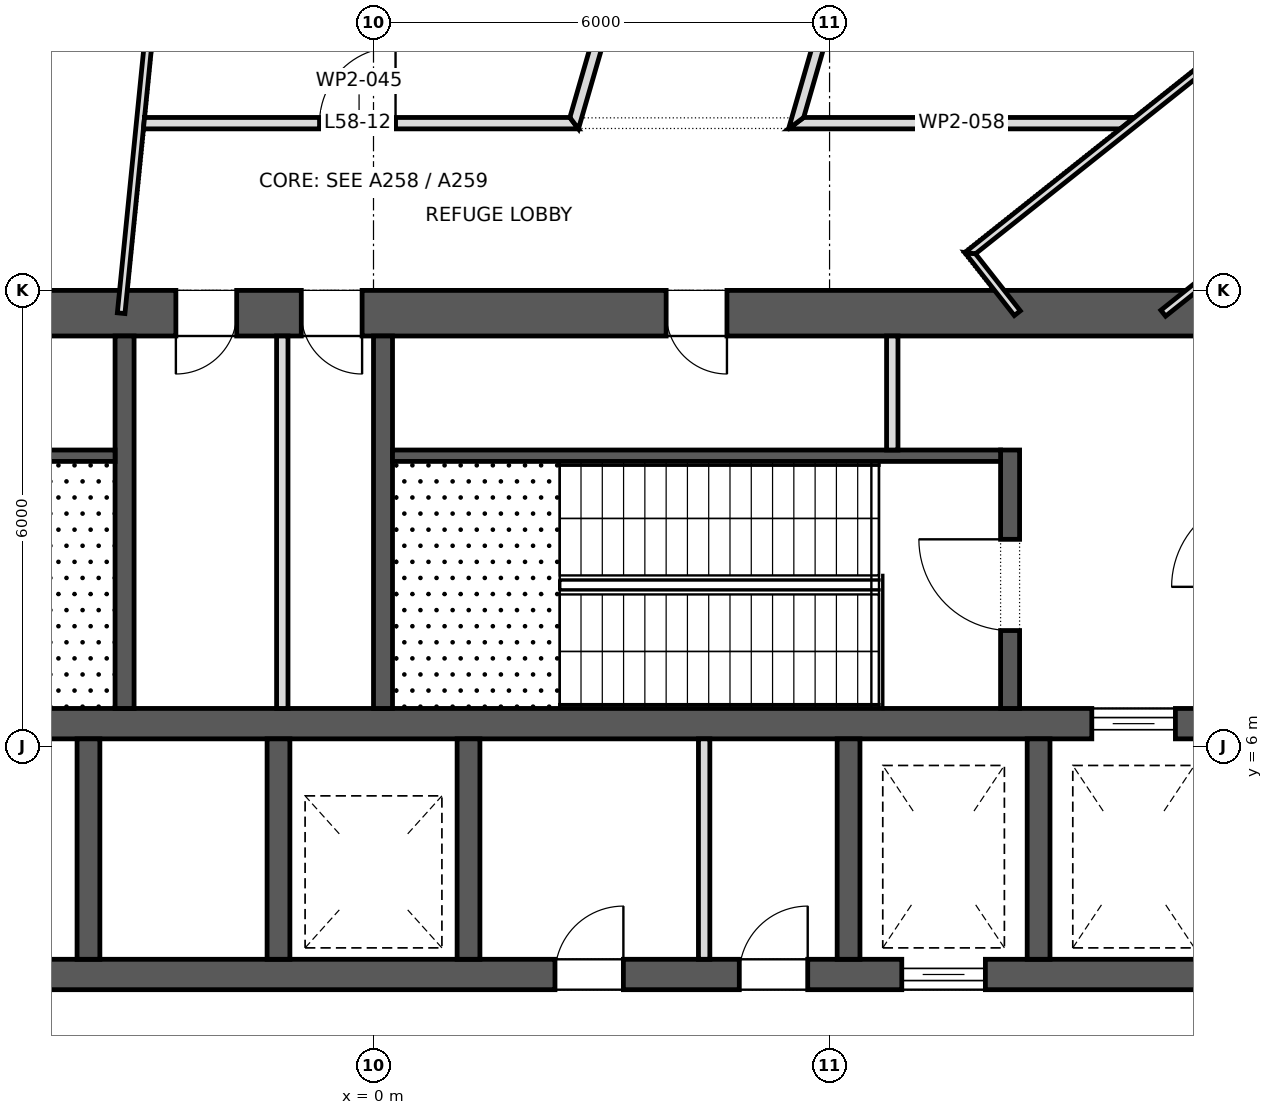
"""IFC4 building model, lengths in metres.
Left out: names, types, materials, properties, quantities, classifications, styles, units other than length and angle.
Written with IfcOpenShell. Run it as: python <this file> out.ifc"""

import sys

from ifc_helpers import new_model, si_unit, direction, frame, frame_2d, origin, place, context, subcontext, project, spatial, polyline, rectangle, outline, extrude, element, fill, save


model = new_model("IFC4")
c1 = context("Model", 3, precision=1e-05, world=origin(), true_north=direction((0.0, 1.0)))
c2 = subcontext(c1, "Body", "Model", "MODEL_VIEW")
j1 = project(units=[si_unit("LENGTHUNIT", "METRE"), si_unit("PLANEANGLEUNIT", "RADIAN")], contexts=[c1])
p1 = place(None, origin())
s1 = spatial("IfcSite", under=j1, at=p1, CompositionType="ELEMENT")
p2 = place(p1, origin())
s2 = spatial("IfcBuilding", under=s1, at=p2, CompositionType="ELEMENT")
p3 = place(p2, frame((0.0, 0.0, 250.9)))
s3 = spatial("IfcBuildingStorey", under=s2, at=p3, CompositionType="ELEMENT", Elevation=250.9)
p4 = place(p3, frame((-12.0, 11.7, 0.0), z_axis=(0.0, 0.0, 1.0), x_axis=(1.0, 0.0, 0.0)))
e1 = element("IfcWall", 1, at=p4, inside=s3, PredefinedType="SHEAR", context=c2, shape_type="SweptSolid", body=[
    extrude(rectangle(XDim=24.0, YDim=0.6, at=frame_2d((12.0, 0.0))), origin(), (0.0, 0.0, 1.0), 5.4),
])
p5 = place(p4, frame((9.4, 0.0, 0.0)))
e2 = element("IfcOpeningElement", 2, at=p5, cuts=e1, PredefinedType="OPENING", context=c2, shape_type="SweptSolid", body=[
    extrude(rectangle(XDim=0.8, YDim=2.1, at=frame_2d((0.4, 1.05))), frame((0.0, 0.312, 0.0), z_axis=(0.0, -1.0, 0.0), x_axis=(1.0, 0.0, 0.0)), (0.0, 0.0, 1.0), 0.624),
])
p6 = place(p4, frame((11.05, 0.0, 0.0)))
e3 = element("IfcOpeningElement", 3, at=p6, cuts=e1, PredefinedType="OPENING", context=c2, shape_type="SweptSolid", body=[
    extrude(rectangle(XDim=0.8, YDim=2.1, at=frame_2d((0.4, 1.05))), frame((0.0, 0.312, 0.0), z_axis=(0.0, -1.0, 0.0), x_axis=(1.0, 0.0, 0.0)), (0.0, 0.0, 1.0), 0.624),
])
p7 = place(p4, frame((4.2, 0.0, 0.0)))
e4 = element("IfcOpeningElement", 4, at=p7, cuts=e1, PredefinedType="OPENING", context=c2, shape_type="SweptSolid", body=[
    extrude(rectangle(XDim=0.8, YDim=2.1, at=frame_2d((0.4, 1.05))), frame((0.0, 0.312, 0.0), z_axis=(0.0, -1.0, 0.0), x_axis=(1.0, 0.0, 0.0)), (0.0, 0.0, 1.0), 0.624),
])
p8 = place(p4, frame((15.85, 0.0, 0.0)))
e5 = element("IfcOpeningElement", 5, at=p8, cuts=e1, PredefinedType="OPENING", context=c2, shape_type="SweptSolid", body=[
    extrude(rectangle(XDim=0.8, YDim=2.1, at=frame_2d((0.4, 1.05))), frame((0.0, 0.312, 0.0), z_axis=(0.0, -1.0, 0.0), x_axis=(1.0, 0.0, 0.0)), (0.0, 0.0, 1.0), 0.624),
])
p9 = place(p3, frame((-11.4, 3.0, 0.0), z_axis=(0.0, 0.0, 1.0), x_axis=(1.0, 0.0, 0.0)))
e6 = element("IfcWall", 6, at=p9, inside=s3, PredefinedType="SHEAR", context=c2, shape_type="SweptSolid", body=[
    extrude(rectangle(XDim=22.8, YDim=0.4, at=frame_2d((11.4, 0.0))), origin(), (0.0, 0.0, 1.0), 5.4),
])
p10 = place(p9, frame((18.35, 0.0, 0.0)))
e7 = element("IfcOpeningElement", 7, at=p10, cuts=e6, PredefinedType="OPENING", context=c2, shape_type="SweptSolid", body=[
    extrude(rectangle(XDim=1.1, YDim=2.1, at=frame_2d((0.55, 1.05))), frame((0.0, 0.212, 0.0), z_axis=(0.0, -1.0, 0.0), x_axis=(1.0, 0.0, 0.0)), (0.0, 0.0, 1.0), 0.424),
])
p11 = place(p9, frame((13.788, 0.0, 0.0)))
e8 = element("IfcOpeningElement", 8, at=p11, cuts=e6, PredefinedType="OPENING", context=c2, shape_type="SweptSolid", body=[
    extrude(rectangle(XDim=0.9, YDim=2.1, at=frame_2d((0.45, 1.05))), frame((0.0, 0.212, 0.0), z_axis=(0.0, -1.0, 0.0), x_axis=(1.0, 0.0, 0.0)), (0.0, 0.0, 1.0), 0.424),
])
p12 = place(p9, frame((16.212, 0.0, 0.0)))
e9 = element("IfcOpeningElement", 9, at=p12, cuts=e6, PredefinedType="OPENING", context=c2, shape_type="SweptSolid", body=[
    extrude(rectangle(XDim=0.9, YDim=2.1, at=frame_2d((0.45, 1.05))), frame((0.0, 0.212, 0.0), z_axis=(0.0, -1.0, 0.0), x_axis=(1.0, 0.0, 0.0)), (0.0, 0.0, 1.0), 0.424),
])
p13 = place(p3, frame((-11.4, 6.3, 0.0), z_axis=(0.0, 0.0, 1.0), x_axis=(1.0, 0.0, 0.0)))
e10 = element("IfcWall", 10, at=p13, inside=s3, PredefinedType="SHEAR", context=c2, shape_type="SweptSolid", body=[
    extrude(rectangle(XDim=22.8, YDim=0.4, at=frame_2d((11.4, 0.0))), origin(), (0.0, 0.0, 1.0), 5.4),
])
p14 = place(p13, frame((20.85, 0.0, 0.0)))
e11 = element("IfcOpeningElement", 11, at=p14, cuts=e10, PredefinedType="OPENING", context=c2, shape_type="SweptSolid", body=[
    extrude(rectangle(XDim=1.1, YDim=2.1, at=frame_2d((0.55, 1.05))), frame((0.0, 0.212, 0.0), z_axis=(0.0, -1.0, 0.0), x_axis=(1.0, 0.0, 0.0)), (0.0, 0.0, 1.0), 0.424),
])
for number, where, z_axis, x_axis in (
    (12, (-3.75, 3.2, 0.0), (0.0, 0.0, 1.0), (0.0, 1.0, 0.0)),
    (13, (-1.25, 3.2, 0.0), (0.0, 0.0, 1.0), (0.0, 1.0, 0.0)),
    (14, (1.25, 3.2, 0.0), (0.0, 0.0, 1.0), (0.0, 1.0, 0.0)),
    (15, (6.25, 3.2, 0.0), (0.0, 0.0, 1.0), (0.0, 1.0, 0.0)),
    (16, (8.75, 3.2, 0.0), (0.0, 0.0, 1.0), (0.0, 1.0, 0.0)),
):
    element("IfcWall", number, at=place(p3, frame(where, z_axis=z_axis, x_axis=x_axis)), inside=s3, PredefinedType="SHEAR", context=c2, shape_type="SweptSolid", body=[
        extrude(rectangle(XDim=2.9, YDim=0.3, at=frame_2d((1.45, 0.0))), origin(), (0.0, 0.0, 1.0), 5.4),
    ])
for number, where, z_axis, x_axis in (
    (17, (-3.275, 6.5, 0.0), (0.0, 0.0, 1.0), (0.0, 1.0, 0.0)),
    (18, (0.125, 6.5, 0.0), (0.0, 0.0, 1.0), (0.0, 1.0, 0.0)),
):
    element("IfcWall", number, at=place(p3, frame(where, z_axis=z_axis, x_axis=x_axis)), inside=s3, PredefinedType="SHEAR", context=c2, shape_type="SweptSolid", body=[
        extrude(rectangle(XDim=4.9, YDim=0.25, at=frame_2d((2.45, 0.0))), origin(), (0.0, 0.0, 1.0), 5.1),
    ])
p15 = place(p3, frame((8.375, 6.5, 0.0), z_axis=(0.0, 0.0, 1.0), x_axis=(0.0, 1.0, 0.0)))
e19 = element("IfcWall", 19, at=p15, inside=s3, PredefinedType="SHEAR", context=c2, shape_type="SweptSolid", body=[
    extrude(rectangle(XDim=3.4, YDim=0.25, at=frame_2d((1.7, 0.0))), origin(), (0.0, 0.0, 1.0), 5.1),
])
p16 = place(p15, frame((1.025, 0.0, 0.0)))
e20 = element("IfcOpeningElement", 20, at=p16, cuts=e19, PredefinedType="OPENING", context=c2, shape_type="SweptSolid", body=[
    extrude(rectangle(XDim=1.2, YDim=2.1, at=frame_2d((0.6, 1.05))), frame((0.0, 0.137, 0.0), z_axis=(0.0, -1.0, 0.0), x_axis=(1.0, 0.0, 0.0)), (0.0, 0.0, 1.0), 0.274),
])
for number, where, z_axis, x_axis in (
    (21, (-11.4, 9.825, 0.0), (0.0, 0.0, 1.0), (1.0, 0.0, 0.0)),
    (22, (0.25, 9.825, 0.0), (0.0, 0.0, 1.0), (1.0, 0.0, 0.0)),
):
    element("IfcWall", number, at=place(p3, frame(where, z_axis=z_axis, x_axis=x_axis)), inside=s3, PredefinedType="SHEAR", context=c2, shape_type="SweptSolid", body=[
        extrude(rectangle(XDim=8.0, YDim=0.15, at=frame_2d((4.0, 0.0))), origin(), (0.0, 0.0, 1.0), 5.1),
    ])
p17 = place(p3, frame((-1.2, 6.5, 0.0), z_axis=(0.0, 0.0, 1.0), x_axis=(0.0, 1.0, 0.0)))
e23 = element("IfcWall", 23, at=p17, inside=s3, PredefinedType="PARTITIONING", context=c2, shape_type="SweptSolid", body=[
    extrude(rectangle(XDim=4.9, YDim=0.15, at=frame_2d((2.45, 0.0))), origin(), (0.0, 0.0, 1.0), 5.1),
])
p18 = place(p3, frame((6.825, 9.9, 0.0), z_axis=(0.0, 0.0, 1.0), x_axis=(0.0, 1.0, 0.0)))
e24 = element("IfcWall", 24, at=p18, inside=s3, PredefinedType="PARTITIONING", context=c2, shape_type="SweptSolid", body=[
    extrude(rectangle(XDim=1.5, YDim=0.15, at=frame_2d((0.75, 0.0))), origin(), (0.0, 0.0, 1.0), 5.1),
])
p19 = place(p3, frame((4.35, 3.2, 0.0), z_axis=(0.0, 0.0, 1.0), x_axis=(0.0, 1.0, 0.0)))
e25 = element("IfcWall", 25, at=p19, inside=s3, PredefinedType="PARTITIONING", context=c2, shape_type="SweptSolid", body=[
    extrude(rectangle(XDim=2.9, YDim=0.15, at=frame_2d((1.45, 0.0))), origin(), (0.0, 0.0, 1.0), 5.1),
])
p20 = place(p3, frame((-3.32, 11.7, 0.0), z_axis=(0.0, 0.0, 1.0), x_axis=(0.0995179867, 0.995035763339, 0.0)))
e26 = element("IfcWall", 26, at=p20, inside=s3, PredefinedType="PARTITIONING", context=c2, shape_type="SweptSolid", body=[
    extrude(outline(polyline([(0.0, -0.05), (1.295, -0.05), (2.59, -0.05), (2.593, -0.05), (2.593, -0.05), (4.552, -0.05), (6.512, -0.05), (8.471, -0.05), (8.471, 0.05), (6.777, 0.05), (5.083, 0.05), (3.388, 0.05), (1.694, 0.05), (0.0, 0.05), (0.0, -0.05)])), origin(), (0.0, 0.0, 1.0), 5.1),
])
p21 = place(p3, frame((-3.027, 14.2, 0.0), z_axis=(0.0, 0.0, 1.0), x_axis=(1.0, 0.0, 0.0)))
e27 = element("IfcWall", 27, at=p21, inside=s3, PredefinedType="PARTITIONING", context=c2, shape_type="SweptSolid", body=[
    extrude(outline(polyline([(5.723, -0.075), (5.723, -0.075), (5.667, 0.0), (5.611, 0.075), (3.745, 0.075), (1.88, 0.075), (0.015, 0.075), (0.0, -0.073), (0.0, -0.075), (1.908, -0.075), (3.816, -0.075), (5.723, -0.075)])), origin(), (0.0, 0.0, 1.0), 5.1),
])
p22 = place(p21, frame((2.317, 0.0, 0.0)))
e28 = element("IfcOpeningElement", 28, at=p22, cuts=e27, PredefinedType="OPENING", context=c2, shape_type="SweptSolid", body=[
    extrude(rectangle(XDim=1.0, YDim=2.1, at=frame_2d((0.5, 1.05))), frame((0.0, 0.087, 0.0), z_axis=(0.0, -1.0, 0.0), x_axis=(1.0, 0.0, 0.0)), (0.0, 0.0, 1.0), 0.174),
])
p23 = place(p3, frame((2.624, 14.146, 0.0), z_axis=(0.0, 0.0, 1.0), x_axis=(0.277874591474, 0.960617359521, 0.0)))
e29 = element("IfcWall", 29, at=p23, inside=s3, PredefinedType="PARTITIONING", context=c2, shape_type="SweptSolid", body=[
    extrude(outline(polyline([(9.822, -0.075), (9.822, -0.075), (9.654, 0.075), (7.746, 0.075), (5.837, 0.075), (3.929, 0.075), (2.021, 0.075), (0.113, 0.075), (0.0, -0.075), (1.965, -0.075), (3.929, -0.075), (5.893, -0.075), (7.857, -0.075), (9.822, -0.075)])), origin(), (0.0, 0.0, 1.0), 5.1),
])
p24 = place(p3, frame((5.46, 14.2, 0.0), z_axis=(0.0, 0.0, 1.0), x_axis=(1.0, 0.0, 0.0)))
e30 = element("IfcWall", 30, at=p24, inside=s3, PredefinedType="PARTITIONING", context=c2, shape_type="SweptSolid", body=[
    extrude(outline(polyline([(0.0, -0.075), (1.455, -0.075), (2.91, -0.075), (4.365, -0.075), (4.553, 0.075), (3.102, 0.075), (1.651, 0.075), (0.199, 0.075), (0.1, 0.0), (0.0, -0.075)])), origin(), (0.0, 0.0, 1.0), 5.1),
])
p25 = place(p3, frame((7.819, 12.529, 0.0), z_axis=(0.0, 0.0, 1.0), x_axis=(0.617350830979, -0.786687963229, 0.0)))
e31 = element("IfcWall", 31, at=p25, inside=s3, PredefinedType="PARTITIONING", context=c2, shape_type="SweptSolid", body=[
    extrude(outline(polyline([(1.054, 0.05), (0.099, 0.05), (0.0, -0.05), (0.0, -0.05), (1.054, -0.05), (1.054, 0.05)])), origin(), (0.0, 0.0, 1.0), 5.1),
])
p26 = place(p3, frame((7.811, 12.459, 0.0), z_axis=(0.0, 0.0, 1.0), x_axis=(0.782532006264, 0.622610359031, 0.0)))
e32 = element("IfcWall", 32, at=p26, inside=s3, PredefinedType="PARTITIONING", context=c2, shape_type="SweptSolid", body=[
    extrude(outline(polyline([(11.08, 0.05), (9.234, 0.05), (7.387, 0.05), (5.54, 0.05), (3.694, 0.05), (1.847, 0.05), (0.0, 0.05), (0.1, -0.05), (1.93, -0.05), (3.76, -0.05), (5.59, -0.05), (7.42, -0.05), (9.25, -0.05), (11.08, -0.05), (11.08, 0.05)])), origin(), (0.0, 0.0, 1.0), 5.1),
])
p27 = place(p3, frame((10.39, 11.7, 0.0), z_axis=(0.0, 0.0, 1.0), x_axis=(0.782322562036, 0.622873509574, 0.0)))
e33 = element("IfcWall", 33, at=p27, inside=s3, PredefinedType="PARTITIONING", context=c2, shape_type="SweptSolid", body=[
    extrude(outline(polyline([(0.0, 0.05), (0.0, -0.05), (1.636, -0.05), (3.272, -0.05), (3.272, 0.05), (1.636, 0.05), (0.0, 0.05)])), origin(), (0.0, 0.0, 1.0), 5.1),
])
p28 = place(p3, frame((7.079, 19.461, 0.0), z_axis=(0.0, 0.0, 1.0), x_axis=(-0.277490255222, -0.960728451883, 0.0)))
e34 = element("IfcWall", 34, at=p28, inside=s3, PredefinedType="PARTITIONING", context=c2, shape_type="SweptSolid", body=[
    extrude(outline(polyline([(5.575, -0.075), (5.575, -0.075), (5.376, 0.075), (3.584, 0.075), (1.792, 0.075), (0.0, 0.075), (0.0, -0.075), (1.858, -0.075), (3.717, -0.075), (5.575, -0.075)])), origin(), (0.0, 0.0, 1.0), 5.1),
])
p29 = place(p28, frame((0.38, 0.0, 0.0)))
e35 = element("IfcOpeningElement", 35, at=p29, cuts=e34, PredefinedType="OPENING", context=c2, shape_type="SweptSolid", body=[
    extrude(rectangle(XDim=1.0, YDim=2.1, at=frame_2d((0.5, 1.05))), frame((0.0, 0.087, 0.0), z_axis=(0.0, -1.0, 0.0), x_axis=(1.0, 0.0, 0.0)), (0.0, 0.0, 1.0), 0.174),
])
p30 = place(p14, origin())
e36 = element("IfcDoor", 36, at=p30, inside=s3, OperationType="SLIDING_TO_LEFT", PredefinedType="DOOR", context=c2, shape_type="SweptSolid", body=[
    extrude(rectangle(XDim=1.1, YDim=2.1, at=frame_2d((0.55, 1.05))), frame((0.0, 0.025, 0.0), z_axis=(0.0, -1.0, 0.0), x_axis=(1.0, 0.0, 0.0)), (0.0, 0.0, 1.0), 0.05),
])
fill(e11, e36)
p31 = place(p10, origin())
e37 = element("IfcDoor", 37, at=p31, inside=s3, OperationType="SLIDING_TO_LEFT", PredefinedType="DOOR", context=c2, shape_type="SweptSolid", body=[
    extrude(rectangle(XDim=1.1, YDim=2.1, at=frame_2d((0.55, 1.05))), frame((0.0, 0.025, 0.0), z_axis=(0.0, -1.0, 0.0), x_axis=(1.0, 0.0, 0.0)), (0.0, 0.0, 1.0), 0.05),
])
fill(e7, e37)
p32 = place(p16, origin())
e38 = element("IfcDoor", 38, at=p32, inside=s3, OperationType="SINGLE_SWING_LEFT", PredefinedType="DOOR", context=c2, shape_type="SweptSolid", body=[
    extrude(rectangle(XDim=1.2, YDim=2.1, at=frame_2d((0.6, 1.05))), frame((0.0, 0.025, 0.0), z_axis=(0.0, -1.0, 0.0), x_axis=(1.0, 0.0, 0.0)), (0.0, 0.0, 1.0), 0.05),
])
fill(e20, e38)
p33 = place(p5, frame((0.8, 0.0, 0.0), z_axis=(0.0, 0.0, 1.0), x_axis=(-1.0, 0.0, 0.0)))
e39 = element("IfcDoor", 39, at=p33, inside=s3, OperationType="SINGLE_SWING_LEFT", PredefinedType="DOOR", context=c2, shape_type="SweptSolid", body=[
    extrude(rectangle(XDim=0.8, YDim=2.1, at=frame_2d((0.4, 1.05))), frame((0.0, 0.025, 0.0), z_axis=(0.0, -1.0, 0.0), x_axis=(1.0, 0.0, 0.0)), (0.0, 0.0, 1.0), 0.05),
])
fill(e2, e39)
p34 = place(p6, frame((0.8, 0.0, 0.0), z_axis=(0.0, 0.0, 1.0), x_axis=(-1.0, 0.0, 0.0)))
e40 = element("IfcDoor", 40, at=p34, inside=s3, OperationType="SINGLE_SWING_RIGHT", PredefinedType="DOOR", context=c2, shape_type="SweptSolid", body=[
    extrude(rectangle(XDim=0.8, YDim=2.1, at=frame_2d((0.4, 1.05))), frame((0.0, 0.025, 0.0), z_axis=(0.0, -1.0, 0.0), x_axis=(1.0, 0.0, 0.0)), (0.0, 0.0, 1.0), 0.05),
])
fill(e3, e40)
p35 = place(p8, frame((0.8, 0.0, 0.0), z_axis=(0.0, 0.0, 1.0), x_axis=(-1.0, 0.0, 0.0)))
e41 = element("IfcDoor", 41, at=p35, inside=s3, OperationType="SINGLE_SWING_RIGHT", PredefinedType="DOOR", context=c2, shape_type="SweptSolid", body=[
    extrude(rectangle(XDim=0.8, YDim=2.1, at=frame_2d((0.4, 1.05))), frame((0.0, 0.025, 0.0), z_axis=(0.0, -1.0, 0.0), x_axis=(1.0, 0.0, 0.0)), (0.0, 0.0, 1.0), 0.05),
])
fill(e5, e41)
p36 = place(p11, origin())
e42 = element("IfcDoor", 42, at=p36, inside=s3, OperationType="SINGLE_SWING_LEFT", PredefinedType="DOOR", context=c2, shape_type="SweptSolid", body=[
    extrude(rectangle(XDim=0.9, YDim=2.1, at=frame_2d((0.45, 1.05))), frame((0.0, 0.025, 0.0), z_axis=(0.0, -1.0, 0.0), x_axis=(1.0, 0.0, 0.0)), (0.0, 0.0, 1.0), 0.05),
])
fill(e8, e42)
p37 = place(p12, origin())
e43 = element("IfcDoor", 43, at=p37, inside=s3, OperationType="SINGLE_SWING_LEFT", PredefinedType="DOOR", context=c2, shape_type="SweptSolid", body=[
    extrude(rectangle(XDim=0.9, YDim=2.1, at=frame_2d((0.45, 1.05))), frame((0.0, 0.025, 0.0), z_axis=(0.0, -1.0, 0.0), x_axis=(1.0, 0.0, 0.0)), (0.0, 0.0, 1.0), 0.05),
])
fill(e9, e43)
p38 = place(p22, origin())
e44 = element("IfcDoor", 44, at=p38, inside=s3, OperationType="SINGLE_SWING_LEFT", PredefinedType="DOOR", context=c2, shape_type="SweptSolid", body=[
    extrude(rectangle(XDim=1.0, YDim=2.1, at=frame_2d((0.5, 1.05))), frame((0.0, 0.025, 0.0), z_axis=(0.0, -1.0, 0.0), x_axis=(1.0, 0.0, 0.0)), (0.0, 0.0, 1.0), 0.05),
])
fill(e28, e44)
save(model, sys.argv[1])
